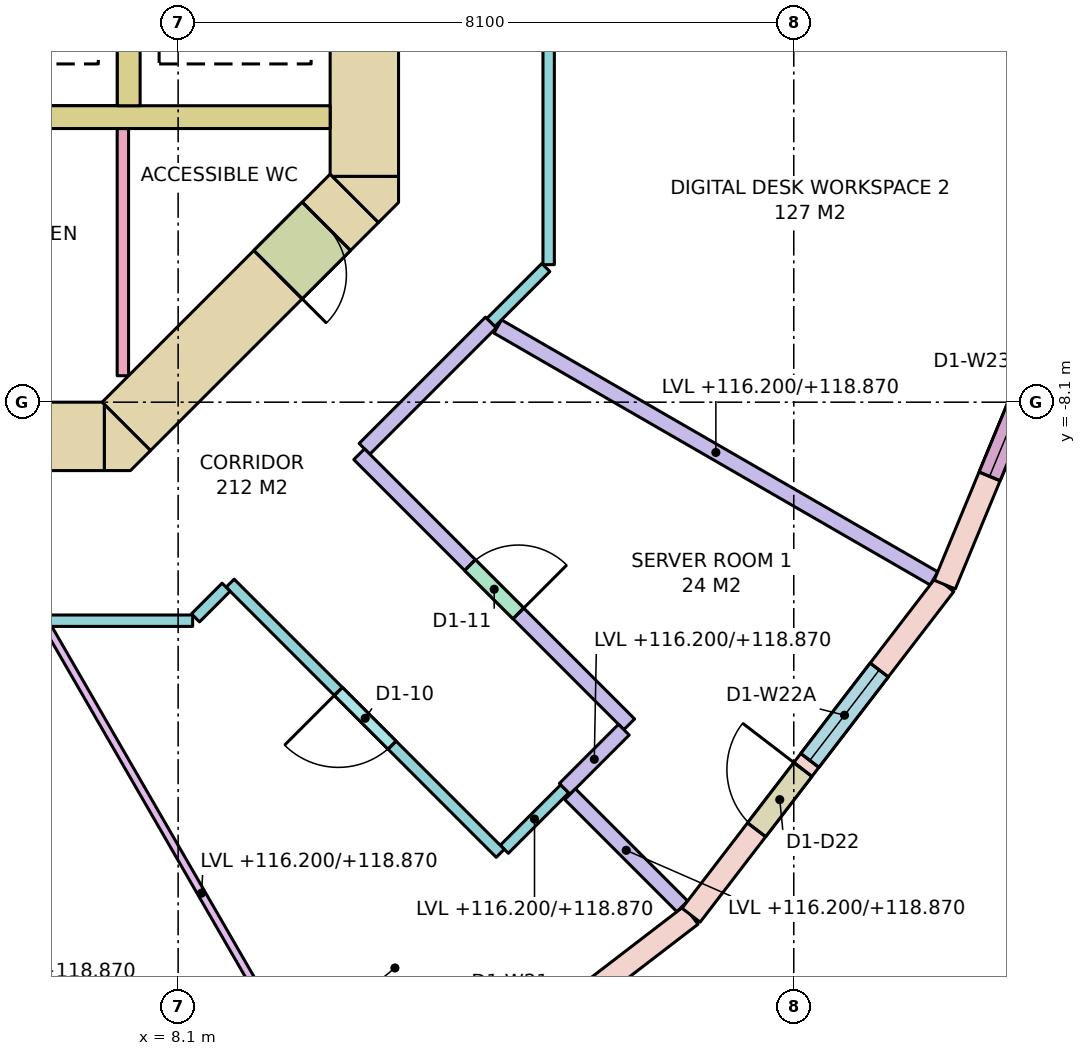
"""IFC4 building model, lengths in metres.
Left out: names, types, materials, properties, quantities, classifications, styles, units other than length and angle.
Written with IfcOpenShell. Run it as: python <this file> out.ifc"""

import sys

from ifc_helpers import new_model, si_unit, direction, frame, frame_2d, origin, place, context, subcontext, project, spatial, polyline, rectangle, outline, extrude, element, fill, save


model = new_model("IFC4")
c1 = context("Model", 3, precision=1e-05, world=origin(), true_north=direction((0.0, 1.0)))
c2 = subcontext(c1, "Body", "Model", "MODEL_VIEW")
j1 = project(units=[si_unit("LENGTHUNIT", "METRE"), si_unit("PLANEANGLEUNIT", "RADIAN")], contexts=[c1])
p1 = place(None, origin())
s1 = spatial("IfcSite", under=j1, at=p1, CompositionType="ELEMENT")
p2 = place(p1, origin())
s2 = spatial("IfcBuilding", under=s1, at=p2, CompositionType="ELEMENT")
p3 = place(p2, frame((0.0, 0.0, 116.2)))
s3 = spatial("IfcBuildingStorey", under=s2, at=p3, CompositionType="ELEMENT", Elevation=116.2)
p4 = place(p3, frame((-7.13, -8.55, -0.28), z_axis=(0.0, 0.0, 1.0), x_axis=(1.0, 0.0, 0.0)))
e1 = element("IfcWall", 1, at=p4, inside=s3, PredefinedType="SHEAR", context=c2, shape_type="SweptSolid", body=[
    extrude(rectangle(XDim=14.26, YDim=0.9, at=frame_2d((7.13, 0.0))), origin(), (0.0, 0.0, 1.0), 3.8),
])
p5 = place(p4, frame((8.08, 0.0, 0.28)))
e2 = element("IfcOpeningElement", 2, at=p5, cuts=e1, PredefinedType="OPENING", context=c2, shape_type="SweptSolid", body=[
    extrude(rectangle(XDim=0.7, YDim=2.1, at=frame_2d((0.35, 1.05))), frame((0.0, 0.46, 0.0), z_axis=(0.0, -1.0, 0.0), x_axis=(1.0, 0.0, 0.0)), (0.0, 0.0, 1.0), 0.92),
])
p6 = place(p4, frame((5.58, 0.0, 0.28)))
e3 = element("IfcOpeningElement", 3, at=p6, cuts=e1, PredefinedType="OPENING", context=c2, shape_type="SweptSolid", body=[
    extrude(rectangle(XDim=0.85, YDim=2.1, at=frame_2d((0.425, 1.05))), frame((0.0, 0.46, 0.0), z_axis=(0.0, -1.0, 0.0), x_axis=(1.0, 0.0, 0.0)), (0.0, 0.0, 1.0), 0.92),
])
p7 = place(p4, frame((6.88, 0.0, 0.28)))
e4 = element("IfcOpeningElement", 4, at=p7, cuts=e1, PredefinedType="OPENING", context=c2, shape_type="SweptSolid", body=[
    extrude(rectangle(XDim=0.85, YDim=2.1, at=frame_2d((0.425, 1.05))), frame((0.0, 0.46, 0.0), z_axis=(0.0, -1.0, 0.0), x_axis=(1.0, 0.0, 0.0)), (0.0, 0.0, 1.0), 0.92),
])
p8 = place(p4, frame((9.967, 0.0, 0.28)))
e5 = element("IfcOpeningElement", 5, at=p8, cuts=e1, PredefinedType="OPENING", context=c2, shape_type="SweptSolid", body=[
    extrude(rectangle(XDim=0.9, YDim=2.1, at=frame_2d((0.45, 1.05))), frame((0.0, 0.46, 0.0), z_axis=(0.0, -1.0, 0.0), x_axis=(1.0, 0.0, 0.0)), (0.0, 0.0, 1.0), 0.92),
])
p9 = place(p4, frame((12.567, 0.0, 0.28)))
e6 = element("IfcOpeningElement", 6, at=p9, cuts=e1, PredefinedType="OPENING", context=c2, shape_type="SweptSolid", body=[
    extrude(rectangle(XDim=0.9, YDim=2.1, at=frame_2d((0.45, 1.05))), frame((0.0, 0.46, 0.0), z_axis=(0.0, -1.0, 0.0), x_axis=(1.0, 0.0, 0.0)), (0.0, 0.0, 1.0), 0.92),
])
p10 = place(p3, frame((10.55, -5.13, -0.28), z_axis=(0.0, 0.0, 1.0), x_axis=(0.0, 1.0, 0.0)))
e7 = element("IfcWall", 7, at=p10, inside=s3, PredefinedType="SHEAR", context=c2, shape_type="SweptSolid", body=[
    extrude(rectangle(XDim=10.26, YDim=0.9, at=frame_2d((5.13, 0.0))), origin(), (0.0, 0.0, 1.0), 3.8),
])
p11 = place(p10, frame((4.13, 0.0, 0.28)))
e8 = element("IfcOpeningElement", 8, at=p11, cuts=e7, PredefinedType="OPENING", context=c2, shape_type="SweptSolid", body=[
    extrude(rectangle(XDim=2.0, YDim=2.1, at=frame_2d((1.0, 1.05))), frame((0.0, 0.46, 0.0), z_axis=(0.0, -1.0, 0.0), x_axis=(1.0, 0.0, 0.0)), (0.0, 0.0, 1.0), 0.92),
])
p12 = place(p3, frame((10.418, -5.418, -0.28), z_axis=(0.0, 0.0, 1.0), x_axis=(-0.707106781187, -0.707106781187, 0.0)))
e9 = element("IfcWall", 9, at=p12, inside=s3, PredefinedType="SHEAR", context=c2, shape_type="SweptSolid", body=[
    extrude(rectangle(XDim=4.243, YDim=0.9, at=frame_2d((2.121, 0.0))), origin(), (0.0, 0.0, 1.0), 3.8),
])
p13 = place(p12, frame((0.52, 0.0, 0.28)))
e10 = element("IfcOpeningElement", 10, at=p13, cuts=e9, PredefinedType="OPENING", context=c2, shape_type="SweptSolid", body=[
    extrude(rectangle(XDim=0.9, YDim=2.1, at=frame_2d((0.45, 1.05))), frame((0.0, 0.46, 0.0), z_axis=(0.0, -1.0, 0.0), x_axis=(1.0, 0.0, 0.0)), (0.0, 0.0, 1.0), 0.92),
])
p14 = place(p3, frame((0.0, 0.0, -0.28)))
e11 = element("IfcWall", 11, at=p14, inside=s3, PredefinedType="SHEAR", context=c2, shape_type="SweptSolid", body=[
    extrude(outline(polyline([(7.473, -9.0), (7.13, -9.0), (7.13, -8.13), (7.736, -8.736), (7.473, -9.0)])), origin(), (0.0, 0.0, 1.0), 3.8),
])
p15 = place(p3, frame((0.0, 0.0, -0.28)))
e12 = element("IfcWall", 12, at=p15, inside=s3, PredefinedType="SHEAR", context=c2, shape_type="SweptSolid", body=[
    extrude(outline(polyline([(11.0, -5.473), (10.736, -5.736), (10.13, -5.13), (11.0, -5.13), (11.0, -5.473)])), origin(), (0.0, 0.0, 1.0), 3.8),
])
p16 = place(p3, frame((2.0, -4.35, 0.0), z_axis=(0.0, 0.0, 1.0), x_axis=(1.0, 0.0, 0.0)))
e13 = element("IfcWall", 13, at=p16, inside=s3, PredefinedType="SOLIDWALL", context=c2, shape_type="SweptSolid", body=[
    extrude(rectangle(XDim=8.1, YDim=0.3, at=frame_2d((4.05, 0.0))), origin(), (0.0, 0.0, 1.0), 3.52),
])
p17 = place(p3, frame((7.45, -4.2, 0.0), z_axis=(0.0, 0.0, 1.0), x_axis=(0.0, 1.0, 0.0)))
e14 = element("IfcWall", 14, at=p17, inside=s3, PredefinedType="SOLIDWALL", context=c2, shape_type="SweptSolid", body=[
    extrude(rectangle(XDim=2.4, YDim=0.3, at=frame_2d((1.2, 0.0))), origin(), (0.0, 0.0, 1.0), 3.52),
])
p18 = place(p3, frame((10.5, -18.187, 0.0), z_axis=(0.0, 0.0, 1.0), x_axis=(0.793335336593, 0.608784891166, 0.0)))
e15 = element("IfcWall", 15, at=p18, inside=s3, PredefinedType="STANDARD", context=c2, shape_type="SweptSolid", body=[
    extrude(rectangle(XDim=5.482, YDim=0.3, at=frame_2d((2.741, 0.0))), origin(), (0.0, 0.0, 1.0), 3.52),
])
p19 = place(p18, frame((1.541, 0.0, 0.8)))
e16 = element("IfcOpeningElement", 16, at=p19, cuts=e15, PredefinedType="OPENING", context=c2, shape_type="SweptSolid", body=[
    extrude(rectangle(XDim=2.4, YDim=2.5, at=frame_2d((1.2, 1.25))), frame((0.0, 0.16, 0.0), z_axis=(0.0, -1.0, 0.0), x_axis=(1.0, 0.0, 0.0)), (0.0, 0.0, 1.0), 0.32),
])
p20 = place(p3, frame((14.849, -14.849, 0.0), z_axis=(0.0, 0.0, 1.0), x_axis=(0.608784891166, 0.793335336593, 0.0)))
e17 = element("IfcWall", 17, at=p20, inside=s3, PredefinedType="STANDARD", context=c2, shape_type="SweptSolid", body=[
    extrude(rectangle(XDim=5.482, YDim=0.3, at=frame_2d((2.741, 0.0))), origin(), (0.0, 0.0, 1.0), 3.52),
])
p21 = place(p20, frame((1.416, 0.0, 0.0)))
e18 = element("IfcOpeningElement", 18, at=p21, cuts=e17, PredefinedType="OPENING", context=c2, shape_type="SweptSolid", body=[
    extrude(rectangle(XDim=1.0, YDim=2.4, at=frame_2d((0.5, 1.2))), frame((0.0, 0.16, 0.0), z_axis=(0.0, -1.0, 0.0), x_axis=(1.0, 0.0, 0.0)), (0.0, 0.0, 1.0), 0.32),
])
p22 = place(p20, frame((2.566, 0.0, 0.8)))
e19 = element("IfcOpeningElement", 19, at=p22, cuts=e17, PredefinedType="OPENING", context=c2, shape_type="SweptSolid", body=[
    extrude(rectangle(XDim=1.5, YDim=2.5, at=frame_2d((0.75, 1.25))), frame((0.0, 0.16, 0.0), z_axis=(0.0, -1.0, 0.0), x_axis=(1.0, 0.0, 0.0)), (0.0, 0.0, 1.0), 0.32),
])
p23 = place(p3, frame((18.187, -10.5, 0.0), z_axis=(0.0, 0.0, 1.0), x_axis=(0.382688740813, 0.923877333662, 0.0)))
e20 = element("IfcWall", 20, at=p23, inside=s3, PredefinedType="STANDARD", context=c2, shape_type="SweptSolid", body=[
    extrude(rectangle(XDim=5.482, YDim=0.3, at=frame_2d((2.741, 0.0))), origin(), (0.0, 0.0, 1.0), 3.52),
])
p24 = place(p23, frame((1.541, 0.0, 0.8)))
e21 = element("IfcOpeningElement", 21, at=p24, cuts=e20, PredefinedType="OPENING", context=c2, shape_type="SweptSolid", body=[
    extrude(rectangle(XDim=2.4, YDim=2.5, at=frame_2d((1.2, 1.25))), frame((0.0, 0.16, 0.0), z_axis=(0.0, -1.0, 0.0), x_axis=(1.0, 0.0, 0.0)), (0.0, 0.0, 1.0), 0.32),
])
p25 = place(p3, frame((7.373, -7.752, 0.0), z_axis=(0.0, 0.0, 1.0), x_axis=(0.0, 1.0, 0.0)))
e22 = element("IfcWall", 22, at=p25, inside=s3, PredefinedType="PARTITIONING", context=c2, shape_type="SweptSolid", body=[
    extrude(rectangle(XDim=3.252, YDim=0.15, at=frame_2d((1.626, 0.0))), origin(), (0.0, 0.0, 1.0), 3.52),
])
p26 = place(p3, frame((12.975, 6.291, 0.0), z_axis=(0.0, 0.0, 1.0), x_axis=(0.0, -1.0, 0.0)))
e23 = element("IfcWall", 23, at=p26, inside=s3, PredefinedType="PARTITIONING", context=c2, shape_type="SweptSolid", body=[
    extrude(rectangle(XDim=12.582, YDim=0.15, at=frame_2d((6.291, 0.0))), origin(), (0.0, 0.0, 1.0), 2.67),
])
p27 = place(p26, frame((5.391, 0.0, 0.0)))
e24 = element("IfcOpeningElement", 24, at=p27, cuts=e23, PredefinedType="OPENING", context=c2, shape_type="SweptSolid", body=[
    extrude(rectangle(XDim=1.8, YDim=2.1, at=frame_2d((0.9, 1.05))), frame((0.0, 0.085, 0.0), z_axis=(0.0, -1.0, 0.0), x_axis=(1.0, 0.0, 0.0)), (0.0, 0.0, 1.0), 0.17),
])
p28 = place(p3, frame((12.938, -6.328, 0.0), z_axis=(0.0, 0.0, 1.0), x_axis=(-0.707106781187, -0.707106781187, 0.0)))
e25 = element("IfcWall", 25, at=p28, inside=s3, PredefinedType="PARTITIONING", context=c2, shape_type="SweptSolid", body=[
    extrude(rectangle(XDim=1.024, YDim=0.15, at=frame_2d((0.512, 0.0))), origin(), (0.0, 0.0, 1.0), 2.67),
])
p29 = place(p3, frame((12.214, -7.052, 0.0), z_axis=(0.0, 0.0, 1.0), x_axis=(-0.707106781187, -0.707106781187, 0.0)))
e26 = element("IfcWall", 26, at=p29, inside=s3, PredefinedType="PARTITIONING", context=c2, shape_type="SweptSolid", body=[
    extrude(rectangle(XDim=2.35, YDim=0.2, at=frame_2d((1.175, 0.0))), origin(), (0.0, 0.0, 1.0), 2.67),
])
p30 = place(p3, frame((10.481, -8.784, 0.0), z_axis=(0.0, 0.0, 1.0), x_axis=(0.707106781187, -0.707106781187, 0.0)))
e27 = element("IfcWall", 27, at=p30, inside=s3, PredefinedType="PARTITIONING", context=c2, shape_type="SweptSolid", body=[
    extrude(rectangle(XDim=5.026, YDim=0.2, at=frame_2d((2.513, 0.0))), origin(), (0.0, 0.0, 1.0), 3.52),
])
p31 = place(p30, frame((2.063, 0.0, 0.0)))
e28 = element("IfcOpeningElement", 28, at=p31, cuts=e27, PredefinedType="OPENING", context=c2, shape_type="SweptSolid", body=[
    extrude(rectangle(XDim=0.9, YDim=2.1, at=frame_2d((0.45, 1.05))), frame((0.0, 0.11, 0.0), z_axis=(0.0, -1.0, 0.0), x_axis=(1.0, 0.0, 0.0)), (0.0, 0.0, 1.0), 0.22),
])
p32 = place(p3, frame((13.964, -12.409, 0.0), z_axis=(0.0, 0.0, 1.0), x_axis=(-0.707106781187, -0.707106781187, 0.0)))
e29 = element("IfcWall", 29, at=p32, inside=s3, PredefinedType="PARTITIONING", context=c2, shape_type="SweptSolid", body=[
    extrude(rectangle(XDim=1.1, YDim=0.2, at=frame_2d((0.55, 0.0))), origin(), (0.0, 0.0, 1.0), 2.67),
])
p33 = place(p3, frame((13.187, -13.187, 0.0), z_axis=(0.0, 0.0, 1.0), x_axis=(-0.706998270979, -0.707215274745, 0.0)))
e30 = element("IfcWall", 30, at=p33, inside=s3, PredefinedType="PARTITIONING", context=c2, shape_type="SweptSolid", body=[
    extrude(rectangle(XDim=1.125, YDim=0.15, at=frame_2d((0.562, 0.0))), origin(), (0.0, 0.0, 1.0), 2.67),
])
p34 = place(p3, frame((12.338, -14.035, 0.0), z_axis=(0.0, 0.0, 1.0), x_axis=(-0.707106781187, 0.707106781187, 0.0)))
e31 = element("IfcWall", 31, at=p34, inside=s3, PredefinedType="PARTITIONING", context=c2, shape_type="SweptSolid", body=[
    extrude(rectangle(XDim=5.026, YDim=0.15, at=frame_2d((2.513, 0.0))), origin(), (0.0, 0.0, 1.0), 3.52),
])
p35 = place(p34, frame((2.013, 0.0, 0.0)))
e32 = element("IfcOpeningElement", 32, at=p35, cuts=e31, PredefinedType="OPENING", context=c2, shape_type="SweptSolid", body=[
    extrude(rectangle(XDim=1.0, YDim=2.1, at=frame_2d((0.5, 1.05))), frame((0.0, 0.085, 0.0), z_axis=(0.0, -1.0, 0.0), x_axis=(1.0, 0.0, 0.0)), (0.0, 0.0, 1.0), 0.17),
])
p36 = place(p3, frame((8.731, -10.534, 0.0), z_axis=(0.0, 0.0, 1.0), x_axis=(-0.707106781187, -0.707106781187, 0.0)))
e33 = element("IfcWall", 33, at=p36, inside=s3, PredefinedType="PARTITIONING", context=c2, shape_type="SweptSolid", body=[
    extrude(rectangle(XDim=0.571, YDim=0.15, at=frame_2d((0.285, 0.0))), origin(), (0.0, 0.0, 1.0), 3.52),
])
p37 = place(p3, frame((8.291, -10.975, 0.0), z_axis=(0.0, 0.0, 1.0), x_axis=(-1.0, 0.0, 0.0)))
e34 = element("IfcWall", 34, at=p37, inside=s3, PredefinedType="PARTITIONING", context=c2, shape_type="SweptSolid", body=[
    extrude(rectangle(XDim=7.016, YDim=0.15, at=frame_2d((3.508, 0.0))), origin(), (0.0, 0.0, 1.0), 2.67),
])
p38 = place(p37, frame((3.198, 0.0, 0.0)))
e35 = element("IfcOpeningElement", 35, at=p38, cuts=e34, PredefinedType="OPENING", context=c2, shape_type="SweptSolid", body=[
    extrude(rectangle(XDim=0.9, YDim=2.1, at=frame_2d((0.45, 1.05))), frame((0.0, 0.085, 0.0), z_axis=(0.0, -1.0, 0.0), x_axis=(1.0, 0.0, 0.0)), (0.0, 0.0, 1.0), 0.17),
])
p39 = place(p3, frame((6.394, -11.075, 0.0), z_axis=(0.0, 0.0, 1.0), x_axis=(0.500024397361, -0.866011317503, 0.0)))
e36 = element("IfcWall", 36, at=p39, inside=s3, PredefinedType="PARTITIONING", context=c2, shape_type="SweptSolid", body=[
    extrude(rectangle(XDim=8.049, YDim=0.1, at=frame_2d((4.024, 0.0))), origin(), (0.0, 0.0, 1.0), 2.67),
])
p40 = place(p3, frame((13.257, -13.257, 0.0), z_axis=(0.0, 0.0, 1.0), x_axis=(0.707106781187, -0.707106781187, 0.0)))
e37 = element("IfcWall", 37, at=p40, inside=s3, PredefinedType="PARTITIONING", context=c2, shape_type="SweptSolid", body=[
    extrude(rectangle(XDim=2.088, YDim=0.2, at=frame_2d((1.044, 0.0))), origin(), (0.0, 0.0, 1.0), 2.67),
])
p41 = place(p3, frame((12.305, -7.104, 0.0), z_axis=(0.0, 0.0, 1.0), x_axis=(0.866019973495, -0.500009405419, 0.0)))
e38 = element("IfcWall", 38, at=p41, inside=s3, PredefinedType="PARTITIONING", context=c2, shape_type="SweptSolid", body=[
    extrude(rectangle(XDim=6.628, YDim=0.2, at=frame_2d((3.314, 0.0))), origin(), (0.0, 0.0, 1.0), 2.67),
])
p42 = place(p21, origin())
e39 = element("IfcDoor", 39, at=p42, inside=s3, OperationType="SINGLE_SWING_RIGHT", PredefinedType="DOOR", context=c2, shape_type="SweptSolid", body=[
    extrude(rectangle(XDim=1.0, YDim=2.4, at=frame_2d((0.5, 1.2))), frame((0.0, 0.025, 0.0), z_axis=(0.0, -1.0, 0.0), x_axis=(1.0, 0.0, 0.0)), (0.0, 0.0, 1.0), 0.05),
])
fill(e18, e39)
p43 = place(p22, origin())
e40 = element("IfcWindow", 40, at=p43, inside=s3, PartitioningType="SINGLE_PANEL", PredefinedType="WINDOW", context=c2, shape_type="SweptSolid", body=[
    extrude(rectangle(XDim=1.5, YDim=2.5, at=frame_2d((0.75, 1.25))), frame((0.0, 0.03, 0.0), z_axis=(0.0, -1.0, 0.0), x_axis=(1.0, 0.0, 0.0)), (0.0, 0.0, 1.0), 0.06),
])
fill(e19, e40)
p44 = place(p24, origin())
e41 = element("IfcWindow", 41, at=p44, inside=s3, PartitioningType="SINGLE_PANEL", PredefinedType="WINDOW", context=c2, shape_type="SweptSolid", body=[
    extrude(rectangle(XDim=2.4, YDim=2.5, at=frame_2d((1.2, 1.25))), frame((0.0, 0.03, 0.0), z_axis=(0.0, -1.0, 0.0), x_axis=(1.0, 0.0, 0.0)), (0.0, 0.0, 1.0), 0.06),
])
fill(e21, e41)
p45 = place(p13, origin())
e42 = element("IfcDoor", 42, at=p45, inside=s3, OperationType="SINGLE_SWING_RIGHT", PredefinedType="DOOR", context=c2, shape_type="SweptSolid", body=[
    extrude(rectangle(XDim=0.9, YDim=2.1, at=frame_2d((0.45, 1.05))), frame((0.0, 0.025, 0.0), z_axis=(0.0, -1.0, 0.0), x_axis=(1.0, 0.0, 0.0)), (0.0, 0.0, 1.0), 0.05),
])
fill(e10, e42)
p46 = place(p35, origin())
e43 = element("IfcDoor", 43, at=p46, inside=s3, OperationType="SINGLE_SWING_RIGHT", PredefinedType="DOOR", context=c2, shape_type="SweptSolid", body=[
    extrude(rectangle(XDim=1.0, YDim=2.1, at=frame_2d((0.5, 1.05))), frame((0.0, 0.025, 0.0), z_axis=(0.0, -1.0, 0.0), x_axis=(1.0, 0.0, 0.0)), (0.0, 0.0, 1.0), 0.05),
])
fill(e32, e43)
p47 = place(p31, origin())
e44 = element("IfcDoor", 44, at=p47, inside=s3, OperationType="SINGLE_SWING_RIGHT", PredefinedType="DOOR", context=c2, shape_type="SweptSolid", body=[
    extrude(rectangle(XDim=0.9, YDim=2.1, at=frame_2d((0.45, 1.05))), frame((0.0, 0.025, 0.0), z_axis=(0.0, -1.0, 0.0), x_axis=(1.0, 0.0, 0.0)), (0.0, 0.0, 1.0), 0.05),
])
fill(e28, e44)
save(model, sys.argv[1])
